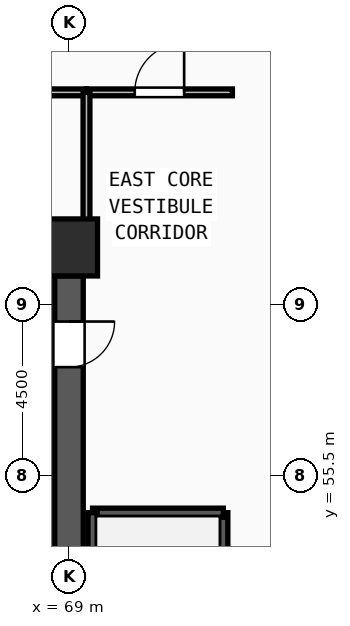
"""IFC4 building model, lengths in metres.
Left out: names, types, materials, properties, quantities, classifications, styles, units other than length and angle.
Written with IfcOpenShell. Run it as: python <this file> out.ifc"""

import sys

from ifc_helpers import new_model, si_unit, direction, frame, frame_2d, origin, origin_2d, place, context, subcontext, project, spatial, rectangle, extrude, source, transform, mapped, element, fill, save


model = new_model("IFC4")
c1 = context("Model", 3, precision=1e-05, world=origin(), true_north=direction((0.0, 1.0)))
c2 = subcontext(c1, "Body", "Model", "MODEL_VIEW")
j1 = project(units=[si_unit("LENGTHUNIT", "METRE"), si_unit("PLANEANGLEUNIT", "RADIAN")], contexts=[c1])
p1 = place(None, origin())
s1 = spatial("IfcSite", under=j1, at=p1, CompositionType="ELEMENT")
p2 = place(p1, origin())
s2 = spatial("IfcBuilding", under=s1, at=p2, CompositionType="ELEMENT")
p3 = place(p2, frame((0.0, 0.0, 113.25)))
s3 = spatial("IfcBuildingStorey", under=s2, at=p3, CompositionType="ELEMENT", Elevation=113.25)
m1 = source(origin(), c2, "Body", "SweptSolid", [
    extrude(rectangle(XDim=1.5, YDim=1.5, at=origin_2d()), origin(), (0.0, 0.0, 1.0), 3.75),
])
p4 = place(p3, frame((69.0, 61.5, 0.0), z_axis=(0.0, 0.0, 1.0), x_axis=(1.0, 0.0, 0.0)))
e1 = element("IfcColumn", 1, at=p4, inside=s3, PredefinedType="COLUMN", context=c2, shape_type="MappedRepresentation", body=[
    mapped(m1, transform((0.0, 0.0, 0.0), x_axis=(1.0, 0.0, 0.0), y_axis=(0.0, 1.0, 0.0), z_axis=(0.0, 0.0, 1.0), scale=1.0)),
])
p5 = place(p3, frame((69.0, 60.75, 0.0), z_axis=(0.0, 0.0, 1.0), x_axis=(0.0, -1.0, 0.0)))
e2 = element("IfcWall", 2, at=p5, inside=s3, PredefinedType="SHEAR", context=c2, shape_type="SweptSolid", body=[
    extrude(rectangle(XDim=13.5, YDim=0.75, at=frame_2d((6.75, 0.0))), origin(), (0.0, 0.0, 1.0), 3.57),
])
m2 = source(origin(), c2, "Body", "SweptSolid", [
    extrude(rectangle(XDim=1.2, YDim=2.2, at=frame_2d((0.6, 1.1))), frame((0.0, 0.385, 0.0), z_axis=(0.0, -1.0, 0.0), x_axis=(1.0, 0.0, 0.0)), (0.0, 0.0, 1.0), 0.77),
])
p6 = place(p5, frame((1.2, 0.0, 0.0)))
e3 = element("IfcOpeningElement", 3, at=p6, cuts=e2, PredefinedType="OPENING", context=c2, shape_type="MappedRepresentation", body=[
    mapped(m2, transform((0.0, 0.0, 0.0), x_axis=(1.0, 0.0, 0.0), y_axis=(0.0, 1.0, 0.0), z_axis=(0.0, 0.0, 1.0), scale=1.0)),
])
p7 = place(p3, frame((73.06, 46.7, 0.0), z_axis=(0.0, 0.0, 1.0), x_axis=(0.0, 1.0, 0.0)))
e4 = element("IfcWall", 4, at=p7, inside=s3, PredefinedType="SOLIDWALL", context=c2, shape_type="SweptSolid", body=[
    extrude(rectangle(XDim=7.82, YDim=0.24, at=frame_2d((3.91, 0.0))), origin(), (0.0, 0.0, 1.0), 3.57),
])
m3 = source(origin(), c2, "Body", "SweptSolid", [
    extrude(rectangle(XDim=1.2, YDim=2.2, at=frame_2d((0.6, 1.1))), frame((0.0, 0.13, 0.0), z_axis=(0.0, -1.0, 0.0), x_axis=(1.0, 0.0, 0.0)), (0.0, 0.0, 1.0), 0.26),
])
p8 = place(p7, frame((0.32, 0.0, 0.0)))
e5 = element("IfcOpeningElement", 5, at=p8, cuts=e4, PredefinedType="OPENING", context=c2, shape_type="MappedRepresentation", body=[
    mapped(m3, transform((0.0, 0.0, 0.0), x_axis=(1.0, 0.0, 0.0), y_axis=(0.0, 1.0, 0.0), z_axis=(0.0, 0.0, 1.0), scale=1.0)),
])
p9 = place(p3, frame((73.06, 54.52, 0.0), z_axis=(0.0, 0.0, 1.0), x_axis=(-1.0, 0.0, 0.0)))
e6 = element("IfcWall", 6, at=p9, inside=s3, PredefinedType="SOLIDWALL", context=c2, shape_type="SweptSolid", body=[
    extrude(rectangle(XDim=3.44, YDim=0.24, at=frame_2d((1.72, 0.0))), origin(), (0.0, 0.0, 1.0), 3.57),
])
p10 = place(p3, frame((69.62, 54.52, 0.0), z_axis=(0.0, 0.0, 1.0), x_axis=(0.0, -1.0, 0.0)))
e7 = element("IfcWall", 7, at=p10, inside=s3, PredefinedType="SOLIDWALL", context=c2, shape_type="SweptSolid", body=[
    extrude(rectangle(XDim=7.82, YDim=0.24, at=frame_2d((3.91, 0.0))), origin(), (0.0, 0.0, 1.0), 3.57),
])
p11 = place(p3, frame((62.39, 65.58, 0.0), z_axis=(0.0, 0.0, 1.0), x_axis=(1.0, 0.0, 0.0)))
e8 = element("IfcWall", 8, at=p11, inside=s3, PredefinedType="PARTITIONING", context=c2, shape_type="SweptSolid", body=[
    extrude(rectangle(XDim=7.07, YDim=0.18, at=frame_2d((3.535, 0.0))), origin(), (0.0, 0.0, 1.0), 3.57),
])
m4 = source(origin(), c2, "Body", "SweptSolid", [
    extrude(rectangle(XDim=1.0, YDim=2.2, at=frame_2d((0.5, 1.1))), frame((0.0, 0.1, 0.0), z_axis=(0.0, -1.0, 0.0), x_axis=(1.0, 0.0, 0.0)), (0.0, 0.0, 1.0), 0.2),
])
p12 = place(p11, frame((3.035, 0.0, 0.0)))
e9 = element("IfcOpeningElement", 9, at=p12, cuts=e8, PredefinedType="OPENING", context=c2, shape_type="MappedRepresentation", body=[
    mapped(m4, transform((0.0, 0.0, 0.0), x_axis=(1.0, 0.0, 0.0), y_axis=(0.0, 1.0, 0.0), z_axis=(0.0, 0.0, 1.0), scale=1.0)),
])
p13 = place(p3, frame((69.46, 65.58, 0.0), z_axis=(0.0, 0.0, 1.0), x_axis=(1.0, 0.0, 0.0)))
e10 = element("IfcWall", 10, at=p13, inside=s3, PredefinedType="PARTITIONING", context=c2, shape_type="SweptSolid", body=[
    extrude(rectangle(XDim=3.84, YDim=0.18, at=frame_2d((1.92, 0.0))), origin(), (0.0, 0.0, 1.0), 3.57),
])
m5 = source(origin(), c2, "Body", "SweptSolid", [
    extrude(rectangle(XDim=1.3, YDim=2.2, at=frame_2d((0.65, 1.1))), frame((0.0, 0.1, 0.0), z_axis=(0.0, -1.0, 0.0), x_axis=(1.0, 0.0, 0.0)), (0.0, 0.0, 1.0), 0.2),
])
p14 = place(p13, frame((1.27, 0.0, 0.0)))
e11 = element("IfcOpeningElement", 11, at=p14, cuts=e10, PredefinedType="OPENING", context=c2, shape_type="MappedRepresentation", body=[
    mapped(m5, transform((0.0, 0.0, 0.0), x_axis=(1.0, 0.0, 0.0), y_axis=(0.0, 1.0, 0.0), z_axis=(0.0, 0.0, 1.0), scale=1.0)),
])
p15 = place(p3, frame((69.46, 61.95, 0.0), z_axis=(0.0, 0.0, 1.0), x_axis=(0.0, 1.0, 0.0)))
e12 = element("IfcWall", 12, at=p15, inside=s3, PredefinedType="PARTITIONING", context=c2, shape_type="SweptSolid", body=[
    extrude(rectangle(XDim=3.63, YDim=0.18, at=frame_2d((1.815, 0.0))), origin(), (0.0, 0.0, 1.0), 3.57),
])
m6 = source(origin(), c2, "Body", "SweptSolid", [
    extrude(rectangle(XDim=1.2, YDim=2.2, at=frame_2d((0.6, 1.1))), frame((0.0, 0.025, 0.0), z_axis=(0.0, -1.0, 0.0), x_axis=(1.0, 0.0, 0.0)), (0.0, 0.0, 1.0), 0.05),
])
p16 = place(p6, origin())
e13 = element("IfcDoor", 13, at=p16, inside=s3, OperationType="SINGLE_SWING_LEFT", PredefinedType="DOOR", context=c2, shape_type="MappedRepresentation", body=[
    mapped(m6, transform((0.0, 0.0, 0.0), x_axis=(1.0, 0.0, 0.0), y_axis=(0.0, 1.0, 0.0), z_axis=(0.0, 0.0, 1.0), scale=1.0)),
])
fill(e3, e13)
m7 = source(origin(), c2, "Body", "SweptSolid", [
    extrude(rectangle(XDim=1.3, YDim=2.2, at=frame_2d((0.65, 1.1))), frame((0.0, 0.025, 0.0), z_axis=(0.0, -1.0, 0.0), x_axis=(1.0, 0.0, 0.0)), (0.0, 0.0, 1.0), 0.05),
])
p17 = place(p14, origin())
e14 = element("IfcDoor", 14, at=p17, inside=s3, OperationType="SINGLE_SWING_RIGHT", PredefinedType="DOOR", context=c2, shape_type="MappedRepresentation", body=[
    mapped(m7, transform((0.0, 0.0, 0.0), x_axis=(1.0, 0.0, 0.0), y_axis=(0.0, 1.0, 0.0), z_axis=(0.0, 0.0, 1.0), scale=1.0)),
])
fill(e11, e14)
save(model, sys.argv[1])
